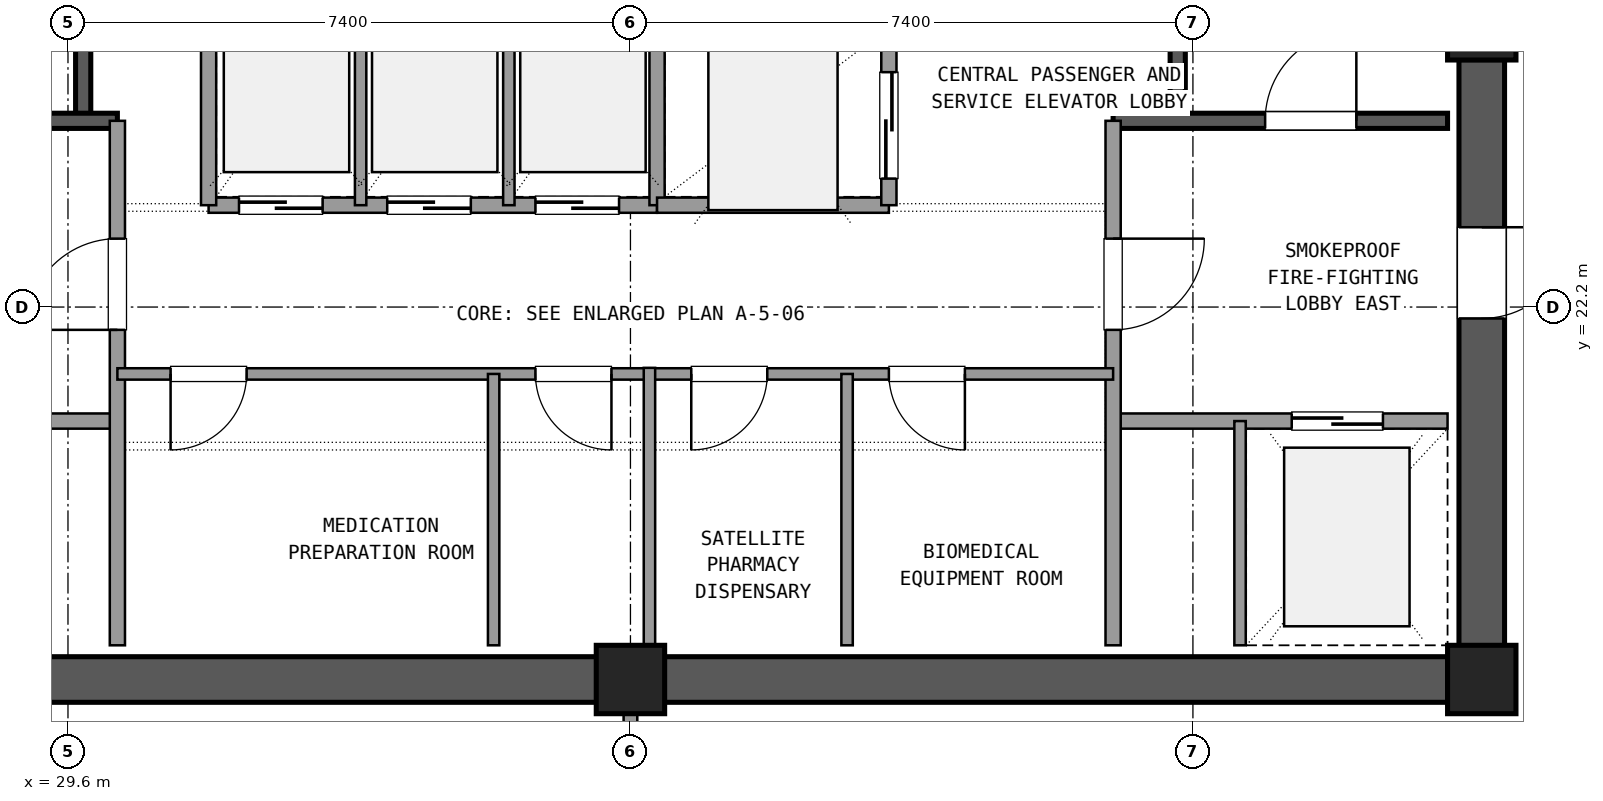
"""IFC4 building model, lengths in metres.
Left out: names, types, materials, properties, quantities, classifications, styles, units other than length and angle.
Written with IfcOpenShell. Run it as: python <this file> out.ifc"""

import sys

from ifc_helpers import new_model, si_unit, direction, frame, frame_2d, origin, origin_2d, place, context, subcontext, project, spatial, rectangle, extrude, element, fill, save


model = new_model("IFC4")
c1 = context("Model", 3, precision=1e-05, world=origin(), true_north=direction((0.0, 1.0)))
c2 = subcontext(c1, "Body", "Model", "MODEL_VIEW")
j1 = project(units=[si_unit("LENGTHUNIT", "METRE"), si_unit("PLANEANGLEUNIT", "RADIAN")], contexts=[c1])
p1 = place(None, origin())
s1 = spatial("IfcSite", under=j1, at=p1, CompositionType="ELEMENT")
p2 = place(p1, origin())
s2 = spatial("IfcBuilding", under=s1, at=p2, CompositionType="ELEMENT")
p3 = place(p2, frame((0.0, 0.0, 196.38)))
s3 = spatial("IfcBuildingStorey", under=s2, at=p3, CompositionType="ELEMENT", Elevation=196.38)
for number, where, z_axis, x_axis in (
    (1, (37.0, 17.3, 0.0), (0.0, 0.0, 1.0), (1.0, 0.0, 0.0)),
    (2, (48.2, 17.3, 0.0), (0.0, 0.0, 1.0), (1.0, 0.0, 0.0)),
    (3, (48.2, 25.9, 0.0), (0.0, 0.0, 1.0), (1.0, 0.0, 0.0)),
):
    element("IfcColumn", number, at=place(p3, frame(where, z_axis=z_axis, x_axis=x_axis)), inside=s3, PredefinedType="COLUMN", context=c2, shape_type="SweptSolid", body=[
        extrude(rectangle(XDim=0.9, YDim=0.9, at=origin_2d()), origin(), (0.0, 0.0, 1.0), 3.6),
    ])
for number, where, z_axis, x_axis in (
    (4, (26.245, 17.3, 0.0), (0.0, 0.0, 1.0), (1.0, 0.0, 0.0)),
    (5, (37.445, 17.3, 0.0), (0.0, 0.0, 1.0), (1.0, 0.0, 0.0)),
):
    element("IfcWall", number, at=place(p3, frame(where, z_axis=z_axis, x_axis=x_axis)), inside=s3, PredefinedType="SHEAR", context=c2, shape_type="SweptSolid", body=[
        extrude(rectangle(XDim=10.31, YDim=0.6, at=frame_2d((5.155, 0.0))), origin(), (0.0, 0.0, 1.0), 3.32),
    ])
p4 = place(p3, frame((48.2, 17.745, 0.0), z_axis=(0.0, 0.0, 1.0), x_axis=(0.0, 1.0, 0.0)))
e6 = element("IfcWall", 6, at=p4, inside=s3, PredefinedType="SHEAR", context=c2, shape_type="SweptSolid", body=[
    extrude(rectangle(XDim=7.71, YDim=0.6, at=frame_2d((3.855, 0.0))), origin(), (0.0, 0.0, 1.0), 3.32),
])
p5 = place(p4, frame((4.305, 0.0, 0.0)))
e7 = element("IfcOpeningElement", 7, at=p5, cuts=e6, PredefinedType="OPENING", context=c2, shape_type="SweptSolid", body=[
    extrude(rectangle(XDim=1.2, YDim=2.15, at=frame_2d((0.6, 1.075))), frame((0.0, 0.31, 0.0), z_axis=(0.0, -1.0, 0.0), x_axis=(1.0, 0.0, 0.0)), (0.0, 0.0, 1.0), 0.62),
])
p6 = place(p3, frame((29.8, 24.65, 0.0), z_axis=(0.0, 0.0, 1.0), x_axis=(0.0, 1.0, 0.0)))
e8 = element("IfcWall", 8, at=p6, inside=s3, PredefinedType="SHEAR", context=c2, shape_type="SweptSolid", body=[
    extrude(rectangle(XDim=9.4, YDim=0.2, at=frame_2d((4.7, 0.0))), origin(), (0.0, 0.0, 1.0), 3.32),
])
p7 = place(p3, frame((26.25, 24.65, 0.0), z_axis=(0.0, 0.0, 1.0), x_axis=(1.0, 0.0, 0.0)))
e9 = element("IfcWall", 9, at=p7, inside=s3, PredefinedType="SHEAR", context=c2, shape_type="SweptSolid", body=[
    extrude(rectangle(XDim=4.0, YDim=0.2, at=frame_2d((2.0, 0.0))), origin(), (0.0, 0.0, 1.0), 3.32),
])
p8 = place(p7, frame((1.0, 0.0, 0.0)))
e10 = element("IfcOpeningElement", 10, at=p8, cuts=e9, PredefinedType="OPENING", context=c2, shape_type="SweptSolid", body=[
    extrude(rectangle(XDim=1.2, YDim=2.15, at=frame_2d((0.6, 1.075))), frame((0.0, 0.11, 0.0), z_axis=(0.0, -1.0, 0.0), x_axis=(1.0, 0.0, 0.0)), (0.0, 0.0, 1.0), 0.22),
])
p9 = place(p3, frame((44.2, 24.65, 0.0), z_axis=(0.0, 0.0, 1.0), x_axis=(0.0, 1.0, 0.0)))
e11 = element("IfcWall", 11, at=p9, inside=s3, PredefinedType="SHEAR", context=c2, shape_type="SweptSolid", body=[
    extrude(rectangle(XDim=9.4, YDim=0.2, at=frame_2d((4.7, 0.0))), origin(), (0.0, 0.0, 1.0), 3.32),
])
p10 = place(p3, frame((43.35, 24.65, 0.0), z_axis=(0.0, 0.0, 1.0), x_axis=(1.0, 0.0, 0.0)))
e12 = element("IfcWall", 12, at=p10, inside=s3, PredefinedType="SHEAR", context=c2, shape_type="SweptSolid", body=[
    extrude(rectangle(XDim=4.4, YDim=0.2, at=frame_2d((2.2, 0.0))), origin(), (0.0, 0.0, 1.0), 3.32),
])
p11 = place(p10, frame((2.0, 0.0, 0.0)))
e13 = element("IfcOpeningElement", 13, at=p11, cuts=e12, PredefinedType="OPENING", context=c2, shape_type="SweptSolid", body=[
    extrude(rectangle(XDim=1.2, YDim=2.15, at=frame_2d((0.6, 1.075))), frame((0.0, 0.11, 0.0), z_axis=(0.0, -1.0, 0.0), x_axis=(1.0, 0.0, 0.0)), (0.0, 0.0, 1.0), 0.22),
])
p12 = place(p3, frame((26.25, 20.7, 0.0), z_axis=(0.0, 0.0, 1.0), x_axis=(1.0, 0.0, 0.0)))
e14 = element("IfcWall", 14, at=p12, inside=s3, PredefinedType="SOLIDWALL", context=c2, shape_type="SweptSolid", body=[
    extrude(rectangle(XDim=4.0, YDim=0.2, at=frame_2d((2.0, 0.0))), origin(), (0.0, 0.0, 1.0), 2.61),
])
p13 = place(p12, frame((0.65, 0.0, 0.0)))
e15 = element("IfcOpeningElement", 15, at=p13, cuts=e14, PredefinedType="OPENING", context=c2, shape_type="SweptSolid", body=[
    extrude(rectangle(XDim=1.2, YDim=2.15, at=frame_2d((0.6, 1.075))), frame((0.0, 0.11, 0.0), z_axis=(0.0, -1.0, 0.0), x_axis=(1.0, 0.0, 0.0)), (0.0, 0.0, 1.0), 0.22),
])
p14 = place(p3, frame((30.25, 17.75, 0.0), z_axis=(0.0, 0.0, 1.0), x_axis=(0.0, 1.0, 0.0)))
e16 = element("IfcWall", 16, at=p14, inside=s3, PredefinedType="SOLIDWALL", context=c2, shape_type="SweptSolid", body=[
    extrude(rectangle(XDim=6.9, YDim=0.2, at=frame_2d((3.45, 0.0))), origin(), (0.0, 0.0, 1.0), 2.61),
])
p15 = place(p14, frame((4.15, 0.0, 0.0)))
e17 = element("IfcOpeningElement", 17, at=p15, cuts=e16, PredefinedType="OPENING", context=c2, shape_type="SweptSolid", body=[
    extrude(rectangle(XDim=1.2, YDim=2.15, at=frame_2d((0.6, 1.075))), frame((0.0, 0.11, 0.0), z_axis=(0.0, -1.0, 0.0), x_axis=(1.0, 0.0, 0.0)), (0.0, 0.0, 1.0), 0.22),
])
p16 = place(p3, frame((43.35, 20.7, 0.0), z_axis=(0.0, 0.0, 1.0), x_axis=(1.0, 0.0, 0.0)))
e18 = element("IfcWall", 18, at=p16, inside=s3, PredefinedType="SOLIDWALL", context=c2, shape_type="SweptSolid", body=[
    extrude(rectangle(XDim=4.4, YDim=0.2, at=frame_2d((2.2, 0.0))), origin(), (0.0, 0.0, 1.0), 2.61),
])
p17 = place(p16, frame((2.35, 0.0, 0.0)))
e19 = element("IfcOpeningElement", 19, at=p17, cuts=e18, PredefinedType="OPENING", context=c2, shape_type="SweptSolid", body=[
    extrude(rectangle(XDim=1.2, YDim=2.15, at=frame_2d((0.6, 1.075))), frame((0.0, 0.11, 0.0), z_axis=(0.0, -1.0, 0.0), x_axis=(1.0, 0.0, 0.0)), (0.0, 0.0, 1.0), 0.22),
])
p18 = place(p3, frame((43.35, 17.75, 0.0), z_axis=(0.0, 0.0, 1.0), x_axis=(0.0, 1.0, 0.0)))
e20 = element("IfcWall", 20, at=p18, inside=s3, PredefinedType="SOLIDWALL", context=c2, shape_type="SweptSolid", body=[
    extrude(rectangle(XDim=6.9, YDim=0.2, at=frame_2d((3.45, 0.0))), origin(), (0.0, 0.0, 1.0), 2.61),
])
p19 = place(p18, frame((4.15, 0.0, 0.0)))
e21 = element("IfcOpeningElement", 21, at=p19, cuts=e20, PredefinedType="OPENING", context=c2, shape_type="SweptSolid", body=[
    extrude(rectangle(XDim=1.2, YDim=2.15, at=frame_2d((0.6, 1.075))), frame((0.0, 0.11, 0.0), z_axis=(0.0, -1.0, 0.0), x_axis=(1.0, 0.0, 0.0)), (0.0, 0.0, 1.0), 0.22),
])
p20 = place(p3, frame((45.02, 17.75, 0.0), z_axis=(0.0, 0.0, 1.0), x_axis=(0.0, 1.0, 0.0)))
e22 = element("IfcWall", 22, at=p20, inside=s3, PredefinedType="PARTITIONING", context=c2, shape_type="SweptSolid", body=[
    extrude(rectangle(XDim=2.95, YDim=0.15, at=frame_2d((1.475, 0.0))), origin(), (0.0, 0.0, 1.0), 2.61),
])
p21 = place(p3, frame((30.25, 21.32, 0.0), z_axis=(0.0, 0.0, 1.0), x_axis=(1.0, 0.0, 0.0)))
e23 = element("IfcWall", 23, at=p21, inside=s3, PredefinedType="PARTITIONING", context=c2, shape_type="SweptSolid", body=[
    extrude(rectangle(XDim=7.0, YDim=0.15, at=frame_2d((3.5, 0.0))), origin(), (0.0, 0.0, 1.0), 2.61),
])
p22 = place(p21, frame((0.7, 0.0, 0.0)))
e24 = element("IfcOpeningElement", 24, at=p22, cuts=e23, PredefinedType="OPENING", context=c2, shape_type="SweptSolid", body=[
    extrude(rectangle(XDim=1.0, YDim=2.15, at=frame_2d((0.5, 1.075))), frame((0.0, 0.085, 0.0), z_axis=(0.0, -1.0, 0.0), x_axis=(1.0, 0.0, 0.0)), (0.0, 0.0, 1.0), 0.17),
])
p23 = place(p21, frame((5.5, 0.0, 0.0)))
e25 = element("IfcOpeningElement", 25, at=p23, cuts=e23, PredefinedType="OPENING", context=c2, shape_type="SweptSolid", body=[
    extrude(rectangle(XDim=1.0, YDim=2.15, at=frame_2d((0.5, 1.075))), frame((0.0, 0.085, 0.0), z_axis=(0.0, -1.0, 0.0), x_axis=(1.0, 0.0, 0.0)), (0.0, 0.0, 1.0), 0.17),
])
p24 = place(p3, frame((35.2, 17.75, 0.0), z_axis=(0.0, 0.0, 1.0), x_axis=(0.0, 1.0, 0.0)))
e26 = element("IfcWall", 26, at=p24, inside=s3, PredefinedType="PARTITIONING", context=c2, shape_type="SweptSolid", body=[
    extrude(rectangle(XDim=3.57, YDim=0.15, at=frame_2d((1.785, 0.0))), origin(), (0.0, 0.0, 1.0), 2.61),
])
p25 = place(p3, frame((37.25, 21.32, 0.0), z_axis=(0.0, 0.0, 1.0), x_axis=(1.0, 0.0, 0.0)))
e27 = element("IfcWall", 27, at=p25, inside=s3, PredefinedType="PARTITIONING", context=c2, shape_type="SweptSolid", body=[
    extrude(rectangle(XDim=6.1, YDim=0.15, at=frame_2d((3.05, 0.0))), origin(), (0.0, 0.0, 1.0), 2.61),
])
p26 = place(p25, frame((0.55, 0.0, 0.0)))
e28 = element("IfcOpeningElement", 28, at=p26, cuts=e27, PredefinedType="OPENING", context=c2, shape_type="SweptSolid", body=[
    extrude(rectangle(XDim=1.0, YDim=2.15, at=frame_2d((0.5, 1.075))), frame((0.0, 0.085, 0.0), z_axis=(0.0, -1.0, 0.0), x_axis=(1.0, 0.0, 0.0)), (0.0, 0.0, 1.0), 0.17),
])
p27 = place(p25, frame((3.15, 0.0, 0.0)))
e29 = element("IfcOpeningElement", 29, at=p27, cuts=e27, PredefinedType="OPENING", context=c2, shape_type="SweptSolid", body=[
    extrude(rectangle(XDim=1.0, YDim=2.15, at=frame_2d((0.5, 1.075))), frame((0.0, 0.085, 0.0), z_axis=(0.0, -1.0, 0.0), x_axis=(1.0, 0.0, 0.0)), (0.0, 0.0, 1.0), 0.17),
])
p28 = place(p3, frame((39.85, 17.75, 0.0), z_axis=(0.0, 0.0, 1.0), x_axis=(0.0, 1.0, 0.0)))
e30 = element("IfcWall", 30, at=p28, inside=s3, PredefinedType="PARTITIONING", context=c2, shape_type="SweptSolid", body=[
    extrude(rectangle(XDim=3.57, YDim=0.15, at=frame_2d((1.785, 0.0))), origin(), (0.0, 0.0, 1.0), 2.61),
])
p29 = place(p3, frame((37.25, 17.75, 0.0), z_axis=(0.0, 0.0, 1.0), x_axis=(0.0, 1.0, 0.0)))
e31 = element("IfcWall", 31, at=p29, inside=s3, PredefinedType="PARTITIONING", context=c2, shape_type="SweptSolid", body=[
    extrude(rectangle(XDim=3.65, YDim=0.15, at=frame_2d((1.825, 0.0))), origin(), (0.0, 0.0, 1.0), 2.61),
])
p30 = place(p3, frame((31.45, 23.54, 0.0), z_axis=(0.0, 0.0, 1.0), x_axis=(1.0, 0.0, 0.0)))
e32 = element("IfcWall", 32, at=p30, inside=s3, PredefinedType="SOLIDWALL", context=c2, shape_type="SweptSolid", body=[
    extrude(rectangle(XDim=5.9, YDim=0.2, at=frame_2d((2.95, 0.0))), origin(), (0.0, 0.0, 1.0), 2.61),
])
p31 = place(p30, frame((0.4, 0.0, 0.0)))
e33 = element("IfcOpeningElement", 33, at=p31, cuts=e32, PredefinedType="OPENING", context=c2, shape_type="SweptSolid", body=[
    extrude(rectangle(XDim=1.1, YDim=2.15, at=frame_2d((0.55, 1.075))), frame((0.0, 0.11, 0.0), z_axis=(0.0, -1.0, 0.0), x_axis=(1.0, 0.0, 0.0)), (0.0, 0.0, 1.0), 0.22),
])
p32 = place(p30, frame((2.35, 0.0, 0.0)))
e34 = element("IfcOpeningElement", 34, at=p32, cuts=e32, PredefinedType="OPENING", context=c2, shape_type="SweptSolid", body=[
    extrude(rectangle(XDim=1.1, YDim=2.15, at=frame_2d((0.55, 1.075))), frame((0.0, 0.11, 0.0), z_axis=(0.0, -1.0, 0.0), x_axis=(1.0, 0.0, 0.0)), (0.0, 0.0, 1.0), 0.22),
])
p33 = place(p30, frame((4.3, 0.0, 0.0)))
e35 = element("IfcOpeningElement", 35, at=p33, cuts=e32, PredefinedType="OPENING", context=c2, shape_type="SweptSolid", body=[
    extrude(rectangle(XDim=1.1, YDim=2.15, at=frame_2d((0.55, 1.075))), frame((0.0, 0.11, 0.0), z_axis=(0.0, -1.0, 0.0), x_axis=(1.0, 0.0, 0.0)), (0.0, 0.0, 1.0), 0.22),
])
p34 = place(p3, frame((31.45, 23.54, 0.0), z_axis=(0.0, 0.0, 1.0), x_axis=(0.0, 1.0, 0.0)))
e36 = element("IfcWall", 36, at=p34, inside=s3, PredefinedType="SOLIDWALL", context=c2, shape_type="SweptSolid", body=[
    extrude(rectangle(XDim=2.81, YDim=0.2, at=frame_2d((1.405, 0.0))), origin(), (0.0, 0.0, 1.0), 2.61),
])
for number, where, z_axis, x_axis in (
    (37, (33.45, 23.54, 0.0), (0.0, 0.0, 1.0), (0.0, 1.0, 0.0)),
    (38, (35.4, 23.54, 0.0), (0.0, 0.0, 1.0), (0.0, 1.0, 0.0)),
):
    element("IfcWall", number, at=place(p3, frame(where, z_axis=z_axis, x_axis=x_axis)), inside=s3, PredefinedType="PARTITIONING", context=c2, shape_type="SweptSolid", body=[
        extrude(rectangle(XDim=2.81, YDim=0.15, at=frame_2d((1.405, 0.0))), origin(), (0.0, 0.0, 1.0), 2.61),
    ])
p35 = place(p3, frame((37.35, 23.54, 0.0), z_axis=(0.0, 0.0, 1.0), x_axis=(0.0, 1.0, 0.0)))
e39 = element("IfcWall", 39, at=p35, inside=s3, PredefinedType="SOLIDWALL", context=c2, shape_type="SweptSolid", body=[
    extrude(rectangle(XDim=6.82, YDim=0.2, at=frame_2d((3.41, 0.0))), origin(), (0.0, 0.0, 1.0), 2.61),
])
p36 = place(p3, frame((37.35, 23.54, 0.0), z_axis=(0.0, 0.0, 1.0), x_axis=(1.0, 0.0, 0.0)))
e40 = element("IfcWall", 40, at=p36, inside=s3, PredefinedType="SOLIDWALL", context=c2, shape_type="SweptSolid", body=[
    extrude(rectangle(XDim=3.05, YDim=0.2, at=frame_2d((1.525, 0.0))), origin(), (0.0, 0.0, 1.0), 2.61),
])
p37 = place(p3, frame((40.4, 23.54, 0.0), z_axis=(0.0, 0.0, 1.0), x_axis=(0.0, 1.0, 0.0)))
e41 = element("IfcWall", 41, at=p37, inside=s3, PredefinedType="SOLIDWALL", context=c2, shape_type="SweptSolid", body=[
    extrude(rectangle(XDim=6.82, YDim=0.2, at=frame_2d((3.41, 0.0))), origin(), (0.0, 0.0, 1.0), 2.61),
])
p38 = place(p37, frame((0.35, 0.0, 0.0)))
e42 = element("IfcOpeningElement", 42, at=p38, cuts=e41, PredefinedType="OPENING", context=c2, shape_type="SweptSolid", body=[
    extrude(rectangle(XDim=1.4, YDim=2.2, at=frame_2d((0.7, 1.1))), frame((0.0, 0.11, 0.0), z_axis=(0.0, -1.0, 0.0), x_axis=(1.0, 0.0, 0.0)), (0.0, 0.0, 1.0), 0.22),
])
p39 = place(p37, frame((2.65, 0.0, 0.0)))
e43 = element("IfcOpeningElement", 43, at=p39, cuts=e41, PredefinedType="OPENING", context=c2, shape_type="SweptSolid", body=[
    extrude(rectangle(XDim=1.4, YDim=2.2, at=frame_2d((0.7, 1.1))), frame((0.0, 0.11, 0.0), z_axis=(0.0, -1.0, 0.0), x_axis=(1.0, 0.0, 0.0)), (0.0, 0.0, 1.0), 0.22),
])
p40 = place(p37, frame((4.85, 0.0, 0.0)))
e44 = element("IfcOpeningElement", 44, at=p40, cuts=e41, PredefinedType="OPENING", context=c2, shape_type="SweptSolid", body=[
    extrude(rectangle(XDim=1.4, YDim=2.2, at=frame_2d((0.7, 1.1))), frame((0.0, 0.11, 0.0), z_axis=(0.0, -1.0, 0.0), x_axis=(1.0, 0.0, 0.0)), (0.0, 0.0, 1.0), 0.22),
])
p41 = place(p3, frame((37.0, 14.15, 0.0), z_axis=(0.0, 0.0, 1.0), x_axis=(0.0, 1.0, 0.0)))
e45 = element("IfcWall", 45, at=p41, inside=s3, PredefinedType="PARTITIONING", context=c2, shape_type="SweptSolid", body=[
    extrude(rectangle(XDim=2.7, YDim=0.18, at=frame_2d((1.35, 0.0))), origin(), (0.0, 0.0, 1.0), 2.61),
])
p42 = place(p41, frame((0.35, 0.0, 0.0)))
e46 = element("IfcOpeningElement", 46, at=p42, cuts=e45, PredefinedType="OPENING", context=c2, shape_type="SweptSolid", body=[
    extrude(rectangle(XDim=2.0, YDim=2.2, at=frame_2d((1.0, 1.1))), frame((0.0, 0.1, 0.0), z_axis=(0.0, -1.0, 0.0), x_axis=(1.0, 0.0, 0.0)), (0.0, 0.0, 1.0), 0.2),
])
p43 = place(p11, origin())
e47 = element("IfcDoor", 47, at=p43, inside=s3, OperationType="SINGLE_SWING_RIGHT", PredefinedType="DOOR", context=c2, shape_type="SweptSolid", body=[
    extrude(rectangle(XDim=1.2, YDim=2.15, at=frame_2d((0.6, 1.075))), frame((0.0, 0.025, 0.0), z_axis=(0.0, -1.0, 0.0), x_axis=(1.0, 0.0, 0.0)), (0.0, 0.0, 1.0), 0.05),
])
fill(e13, e47)
p44 = place(p15, origin())
e48 = element("IfcDoor", 48, at=p44, inside=s3, OperationType="SINGLE_SWING_LEFT", PredefinedType="DOOR", context=c2, shape_type="SweptSolid", body=[
    extrude(rectangle(XDim=1.2, YDim=2.15, at=frame_2d((0.6, 1.075))), frame((0.0, 0.025, 0.0), z_axis=(0.0, -1.0, 0.0), x_axis=(1.0, 0.0, 0.0)), (0.0, 0.0, 1.0), 0.05),
])
fill(e17, e48)
p45 = place(p17, origin())
e49 = element("IfcDoor", 49, at=p45, inside=s3, OperationType="SLIDING_TO_RIGHT", PredefinedType="DOOR", context=c2, shape_type="SweptSolid", body=[
    extrude(rectangle(XDim=1.2, YDim=2.15, at=frame_2d((0.6, 1.075))), frame((0.0, 0.025, 0.0), z_axis=(0.0, -1.0, 0.0), x_axis=(1.0, 0.0, 0.0)), (0.0, 0.0, 1.0), 0.05),
])
fill(e19, e49)
p46 = place(p19, frame((1.2, 0.0, 0.0), z_axis=(0.0, 0.0, 1.0), x_axis=(-1.0, 0.0, 0.0)))
e50 = element("IfcDoor", 50, at=p46, inside=s3, OperationType="SINGLE_SWING_RIGHT", PredefinedType="DOOR", context=c2, shape_type="SweptSolid", body=[
    extrude(rectangle(XDim=1.2, YDim=2.15, at=frame_2d((0.6, 1.075))), frame((0.0, 0.025, 0.0), z_axis=(0.0, -1.0, 0.0), x_axis=(1.0, 0.0, 0.0)), (0.0, 0.0, 1.0), 0.05),
])
fill(e21, e50)
p47 = place(p5, frame((1.2, 0.0, 0.0), z_axis=(0.0, 0.0, 1.0), x_axis=(-1.0, 0.0, 0.0)))
e51 = element("IfcDoor", 51, at=p47, inside=s3, OperationType="SINGLE_SWING_RIGHT", PredefinedType="DOOR", context=c2, shape_type="SweptSolid", body=[
    extrude(rectangle(XDim=1.2, YDim=2.15, at=frame_2d((0.6, 1.075))), frame((0.0, 0.025, 0.0), z_axis=(0.0, -1.0, 0.0), x_axis=(1.0, 0.0, 0.0)), (0.0, 0.0, 1.0), 0.05),
])
fill(e7, e51)
p48 = place(p22, frame((1.0, 0.0, 0.0), z_axis=(0.0, 0.0, 1.0), x_axis=(-1.0, 0.0, 0.0)))
e52 = element("IfcDoor", 52, at=p48, inside=s3, OperationType="SINGLE_SWING_LEFT", PredefinedType="DOOR", context=c2, shape_type="SweptSolid", body=[
    extrude(rectangle(XDim=1.0, YDim=2.15, at=frame_2d((0.5, 1.075))), frame((0.0, 0.025, 0.0), z_axis=(0.0, -1.0, 0.0), x_axis=(1.0, 0.0, 0.0)), (0.0, 0.0, 1.0), 0.05),
])
fill(e24, e52)
p49 = place(p23, frame((1.0, 0.0, 0.0), z_axis=(0.0, 0.0, 1.0), x_axis=(-1.0, 0.0, 0.0)))
e53 = element("IfcDoor", 53, at=p49, inside=s3, OperationType="SINGLE_SWING_RIGHT", PredefinedType="DOOR", context=c2, shape_type="SweptSolid", body=[
    extrude(rectangle(XDim=1.0, YDim=2.15, at=frame_2d((0.5, 1.075))), frame((0.0, 0.025, 0.0), z_axis=(0.0, -1.0, 0.0), x_axis=(1.0, 0.0, 0.0)), (0.0, 0.0, 1.0), 0.05),
])
fill(e25, e53)
p50 = place(p26, frame((1.0, 0.0, 0.0), z_axis=(0.0, 0.0, 1.0), x_axis=(-1.0, 0.0, 0.0)))
e54 = element("IfcDoor", 54, at=p50, inside=s3, OperationType="SINGLE_SWING_LEFT", PredefinedType="DOOR", context=c2, shape_type="SweptSolid", body=[
    extrude(rectangle(XDim=1.0, YDim=2.15, at=frame_2d((0.5, 1.075))), frame((0.0, 0.025, 0.0), z_axis=(0.0, -1.0, 0.0), x_axis=(1.0, 0.0, 0.0)), (0.0, 0.0, 1.0), 0.05),
])
fill(e28, e54)
p51 = place(p27, frame((1.0, 0.0, 0.0), z_axis=(0.0, 0.0, 1.0), x_axis=(-1.0, 0.0, 0.0)))
e55 = element("IfcDoor", 55, at=p51, inside=s3, OperationType="SINGLE_SWING_RIGHT", PredefinedType="DOOR", context=c2, shape_type="SweptSolid", body=[
    extrude(rectangle(XDim=1.0, YDim=2.15, at=frame_2d((0.5, 1.075))), frame((0.0, 0.025, 0.0), z_axis=(0.0, -1.0, 0.0), x_axis=(1.0, 0.0, 0.0)), (0.0, 0.0, 1.0), 0.05),
])
fill(e29, e55)
p52 = place(p31, origin())
e56 = element("IfcDoor", 56, at=p52, inside=s3, OperationType="SLIDING_TO_RIGHT", PredefinedType="DOOR", context=c2, shape_type="SweptSolid", body=[
    extrude(rectangle(XDim=1.1, YDim=2.15, at=frame_2d((0.55, 1.075))), frame((0.0, 0.025, 0.0), z_axis=(0.0, -1.0, 0.0), x_axis=(1.0, 0.0, 0.0)), (0.0, 0.0, 1.0), 0.05),
])
fill(e33, e56)
p53 = place(p32, origin())
e57 = element("IfcDoor", 57, at=p53, inside=s3, OperationType="SLIDING_TO_RIGHT", PredefinedType="DOOR", context=c2, shape_type="SweptSolid", body=[
    extrude(rectangle(XDim=1.1, YDim=2.15, at=frame_2d((0.55, 1.075))), frame((0.0, 0.025, 0.0), z_axis=(0.0, -1.0, 0.0), x_axis=(1.0, 0.0, 0.0)), (0.0, 0.0, 1.0), 0.05),
])
fill(e34, e57)
p54 = place(p33, origin())
e58 = element("IfcDoor", 58, at=p54, inside=s3, OperationType="SLIDING_TO_RIGHT", PredefinedType="DOOR", context=c2, shape_type="SweptSolid", body=[
    extrude(rectangle(XDim=1.1, YDim=2.15, at=frame_2d((0.55, 1.075))), frame((0.0, 0.025, 0.0), z_axis=(0.0, -1.0, 0.0), x_axis=(1.0, 0.0, 0.0)), (0.0, 0.0, 1.0), 0.05),
])
fill(e35, e58)
p55 = place(p38, origin())
e59 = element("IfcDoor", 59, at=p55, inside=s3, OperationType="SLIDING_TO_LEFT", PredefinedType="DOOR", context=c2, shape_type="SweptSolid", body=[
    extrude(rectangle(XDim=1.4, YDim=2.2, at=frame_2d((0.7, 1.1))), frame((0.0, 0.025, 0.0), z_axis=(0.0, -1.0, 0.0), x_axis=(1.0, 0.0, 0.0)), (0.0, 0.0, 1.0), 0.05),
])
fill(e42, e59)
save(model, sys.argv[1])
